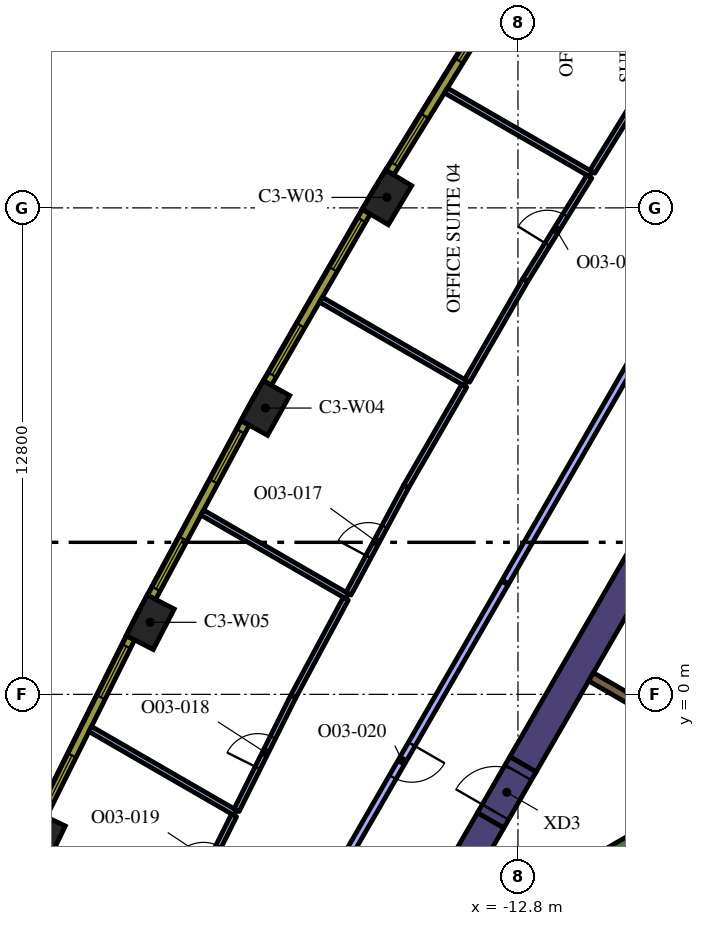
"""IFC4 building model, lengths in metres.
Left out: names, types, materials, properties, quantities, classifications, styles, units other than length and angle.
Written with IfcOpenShell. Run it as: python <this file> out.ifc"""

import sys

from ifc_helpers import new_model, si_unit, direction, frame, frame_2d, origin, origin_2d, place, context, subcontext, project, spatial, rectangle, extrude, element, fill, save


model = new_model("IFC4")
c1 = context("Model", 3, precision=1e-05, world=origin(), true_north=direction((0.0, 1.0)))
c2 = subcontext(c1, "Body", "Model", "MODEL_VIEW")
j1 = project(units=[si_unit("LENGTHUNIT", "METRE"), si_unit("PLANEANGLEUNIT", "RADIAN")], contexts=[c1])
p1 = place(None, origin())
s1 = spatial("IfcSite", under=j1, at=p1, CompositionType="ELEMENT")
p2 = place(p1, origin())
s2 = spatial("IfcBuilding", under=s1, at=p2, CompositionType="ELEMENT")
p3 = place(p2, frame((0.0, 0.0, 175.2)))
s3 = spatial("IfcBuildingStorey", under=s2, at=p3, CompositionType="ELEMENT", Elevation=175.2)
for number, where, z_axis, x_axis in (
    (1, (-16.247, 13.075, 0.0), (0.0, 0.0, 1.0), (-0.513, -0.858, 0.0)),
    (2, (-19.447, 7.533, 0.0), (0.0, 0.0, 1.0), (-0.487, -0.874, 0.0)),
    (3, (-22.476, 1.896, 0.0), (0.0, 0.0, 1.0), (-0.46, -0.888, 0.0)),
    (4, (-25.332, -3.832, 0.0), (0.0, 0.0, 1.0), (-0.433, -0.902, 0.0)),
):
    element("IfcColumn", number, at=place(p3, frame(where, z_axis=z_axis, x_axis=x_axis)), inside=s3, PredefinedType="COLUMN", context=c2, shape_type="SweptSolid", body=[
        extrude(rectangle(XDim=1.2, YDim=0.8, at=origin_2d()), origin(), (0.0, 0.0, 1.0), 4.2),
    ])
p4 = place(p3, frame((-13.518, -3.314, 0.0), z_axis=(0.0, 0.0, 1.0), x_axis=(-0.499969377405, -0.866043083026, 0.0)))
e5 = element("IfcWall", 5, at=p4, inside=s3, PredefinedType="SOLIDWALL", context=c2, shape_type="SweptSolid", body=[
    extrude(rectangle(XDim=2.824, YDim=0.8, at=frame_2d((1.412, 0.0))), origin(), (0.0, 0.0, 1.0), 4.2),
])
p5 = place(p3, frame((-12.668, -1.842, 0.0), z_axis=(0.0, 0.0, 1.0), x_axis=(0.500003640647, 0.866023301845, 0.0)))
e6 = element("IfcWall", 6, at=p5, inside=s3, PredefinedType="SOLIDWALL", context=c2, shape_type="SweptSolid", body=[
    extrude(rectangle(XDim=15.858, YDim=0.8, at=frame_2d((7.929, 0.0))), origin(), (0.0, 0.0, 1.0), 4.2),
])
p6 = place(p3, frame((-14.44, -6.49, 0.0), z_axis=(0.0, 0.0, 1.0), x_axis=(0.866022966069, 0.500004222222, 0.0)))
e7 = element("IfcWall", 7, at=p6, inside=s3, PredefinedType="SOLIDWALL", context=c2, shape_type="SweptSolid", body=[
    extrude(rectangle(XDim=6.8, YDim=0.25, at=frame_2d((3.4, 0.0))), origin(), (0.0, 0.0, 1.0), 4.2),
])
p7 = place(p3, frame((-8.106, -1.14, 0.0), z_axis=(0.0, 0.0, 1.0), x_axis=(-0.866008981251, 0.500028443584, 0.0)))
e8 = element("IfcWall", 8, at=p7, inside=s3, PredefinedType="SOLIDWALL", context=c2, shape_type="SweptSolid", body=[
    extrude(rectangle(XDim=3.2, YDim=0.25, at=frame_2d((1.6, 0.0))), origin(), (0.0, 0.0, 1.0), 4.2),
])
p8 = place(p3, frame((-13.518, -3.314, 0.0), z_axis=(0.0, 0.0, 1.0), x_axis=(0.500000056704, 0.866025371046, 0.0)))
e9 = element("IfcWall", 9, at=p8, inside=s3, PredefinedType="SOLIDWALL", context=c2, shape_type="SweptSolid", body=[
    extrude(rectangle(XDim=1.7, YDim=0.8, at=frame_2d((0.85, 0.0))), origin(), (0.0, 0.0, 1.0), 4.2),
])
p9 = place(p8, frame((0.25, 0.0, 0.0)))
e10 = element("IfcOpeningElement", 10, at=p9, cuts=e9, PredefinedType="OPENING", context=c2, shape_type="SweptSolid", body=[
    extrude(rectangle(XDim=1.2, YDim=2.1, at=frame_2d((0.6, 1.05))), frame((0.0, 0.41, 0.0), z_axis=(0.0, -1.0, 0.0), x_axis=(1.0, 0.0, 0.0)), (0.0, 0.0, 1.0), 0.82),
])
p10 = place(p3, frame((-10.883, 13.687, 0.0), z_axis=(0.0, 0.0, 1.0), x_axis=(-0.866033195618, 0.499986503906, 0.0)))
e11 = element("IfcWall", 11, at=p10, inside=s3, PredefinedType="PARTITIONING", context=c2, shape_type="SweptSolid", body=[
    extrude(rectangle(XDim=4.402, YDim=0.15, at=frame_2d((2.201, 0.0))), origin(), (0.0, 0.0, 1.0), 3.15),
])
p11 = place(p3, frame((-9.308, 16.231, 0.0), z_axis=(0.0, 0.0, 1.0), x_axis=(-0.526201893736, -0.850359669216, 0.0)))
e12 = element("IfcWall", 12, at=p11, inside=s3, PredefinedType="PARTITIONING", context=c2, shape_type="SweptSolid", body=[
    extrude(rectangle(XDim=2.917, YDim=0.15, at=frame_2d((1.458, 0.0))), origin(), (0.0, 0.0, 1.0), 3.15),
])
p12 = place(p3, frame((-14.175, 8.184, 0.0), z_axis=(0.0, 0.0, 1.0), x_axis=(-0.866032203192, 0.499988222896, 0.0)))
e13 = element("IfcWall", 13, at=p12, inside=s3, PredefinedType="PARTITIONING", context=c2, shape_type="SweptSolid", body=[
    extrude(rectangle(XDim=4.4, YDim=0.15, at=frame_2d((2.2, 0.0))), origin(), (0.0, 0.0, 1.0), 3.15),
])
p13 = place(p3, frame((-12.608, 10.899, 0.0), z_axis=(0.0, 0.0, 1.0), x_axis=(0.526170942761, 0.850378820876, 0.0)))
e14 = element("IfcWall", 14, at=p13, inside=s3, PredefinedType="PARTITIONING", context=c2, shape_type="SweptSolid", body=[
    extrude(rectangle(XDim=3.203, YDim=0.15, at=frame_2d((1.602, 0.0))), origin(), (0.0, 0.0, 1.0), 3.15),
])
p14 = place(p13, frame((1.103, 0.0, 0.0)))
e15 = element("IfcOpeningElement", 15, at=p14, cuts=e14, PredefinedType="OPENING", context=c2, shape_type="SweptSolid", body=[
    extrude(rectangle(XDim=0.9, YDim=2.1, at=frame_2d((0.45, 1.05))), frame((0.0, 0.085, 0.0), z_axis=(0.0, -1.0, 0.0), x_axis=(1.0, 0.0, 0.0)), (0.0, 0.0, 1.0), 0.17),
])
p15 = place(p3, frame((-12.608, 10.899, 0.0), z_axis=(0.0, 0.0, 1.0), x_axis=(-0.499991792115, -0.866030142557, 0.0)))
e16 = element("IfcWall", 16, at=p15, inside=s3, PredefinedType="PARTITIONING", context=c2, shape_type="SweptSolid", body=[
    extrude(rectangle(XDim=3.06, YDim=0.15, at=frame_2d((1.53, 0.0))), origin(), (0.0, 0.0, 1.0), 3.15),
])
p16 = place(p3, frame((-17.295, 2.581, 0.0), z_axis=(0.0, 0.0, 1.0), x_axis=(-0.866033195618, 0.499986503906, 0.0)))
e17 = element("IfcWall", 17, at=p16, inside=s3, PredefinedType="PARTITIONING", context=c2, shape_type="SweptSolid", body=[
    extrude(rectangle(XDim=4.402, YDim=0.15, at=frame_2d((2.201, 0.0))), origin(), (0.0, 0.0, 1.0), 3.15),
])
p17 = place(p3, frame((-14.213, 8.119, 0.0), z_axis=(0.0, 0.0, 1.0), x_axis=(-0.499991792115, -0.866030142557, 0.0)))
e18 = element("IfcWall", 18, at=p17, inside=s3, PredefinedType="PARTITIONING", context=c2, shape_type="SweptSolid", body=[
    extrude(rectangle(XDim=3.06, YDim=0.15, at=frame_2d((1.53, 0.0))), origin(), (0.0, 0.0, 1.0), 3.15),
])
p18 = place(p3, frame((-17.259, 2.647, 0.0), z_axis=(0.0, 0.0, 1.0), x_axis=(0.473299711777, 0.880901460341, 0.0)))
e19 = element("IfcWall", 19, at=p18, inside=s3, PredefinedType="PARTITIONING", context=c2, shape_type="SweptSolid", body=[
    extrude(rectangle(XDim=3.203, YDim=0.15, at=frame_2d((1.602, 0.0))), origin(), (0.0, 0.0, 1.0), 3.15),
])
p19 = place(p18, frame((1.104, 0.0, 0.0)))
e20 = element("IfcOpeningElement", 20, at=p19, cuts=e19, PredefinedType="OPENING", context=c2, shape_type="SweptSolid", body=[
    extrude(rectangle(XDim=0.9, YDim=2.1, at=frame_2d((0.45, 1.05))), frame((0.0, 0.085, 0.0), z_axis=(0.0, -1.0, 0.0), x_axis=(1.0, 0.0, 0.0)), (0.0, 0.0, 1.0), 0.17),
])
p20 = place(p3, frame((-20.238, -3.117, 0.0), z_axis=(0.0, 0.0, 1.0), x_axis=(-0.866026031126, 0.499998913411, 0.0)))
e21 = element("IfcWall", 21, at=p20, inside=s3, PredefinedType="PARTITIONING", context=c2, shape_type="SweptSolid", body=[
    extrude(rectangle(XDim=4.408, YDim=0.15, at=frame_2d((2.204, 0.0))), origin(), (0.0, 0.0, 1.0), 3.15),
])
p21 = place(p3, frame((-17.33, 2.515, 0.0), z_axis=(0.0, 0.0, 1.0), x_axis=(-0.473335958085, -0.880881984595, 0.0)))
e22 = element("IfcWall", 22, at=p21, inside=s3, PredefinedType="PARTITIONING", context=c2, shape_type="SweptSolid", body=[
    extrude(rectangle(XDim=2.917, YDim=0.15, at=frame_2d((1.458, 0.0))), origin(), (0.0, 0.0, 1.0), 3.15),
])
p22 = place(p3, frame((-20.204, -3.049, 0.0), z_axis=(0.0, 0.0, 1.0), x_axis=(0.446250363478, 0.894908159029, 0.0)))
e23 = element("IfcWall", 23, at=p22, inside=s3, PredefinedType="PARTITIONING", context=c2, shape_type="SweptSolid", body=[
    extrude(rectangle(XDim=3.347, YDim=0.15, at=frame_2d((1.673, 0.0))), origin(), (0.0, 0.0, 1.0), 3.15),
])
p23 = place(p22, frame((1.247, 0.0, 0.0)))
e24 = element("IfcOpeningElement", 24, at=p23, cuts=e23, PredefinedType="OPENING", context=c2, shape_type="SweptSolid", body=[
    extrude(rectangle(XDim=0.9, YDim=2.1, at=frame_2d((0.45, 1.05))), frame((0.0, 0.085, 0.0), z_axis=(0.0, -1.0, 0.0), x_axis=(1.0, 0.0, 0.0)), (0.0, 0.0, 1.0), 0.17),
])
p24 = place(p3, frame((-21.509, -5.666, 0.0), z_axis=(0.0, 0.0, 1.0), x_axis=(0.446192228952, 0.894937145739, 0.0)))
e25 = element("IfcWall", 25, at=p24, inside=s3, PredefinedType="PARTITIONING", context=c2, shape_type="SweptSolid", body=[
    extrude(rectangle(XDim=2.774, YDim=0.15, at=frame_2d((1.387, 0.0))), origin(), (0.0, 0.0, 1.0), 3.15),
])
p25 = place(p24, frame((0.973, 0.0, 0.0)))
e26 = element("IfcOpeningElement", 26, at=p25, cuts=e25, PredefinedType="OPENING", context=c2, shape_type="SweptSolid", body=[
    extrude(rectangle(XDim=0.9, YDim=2.1, at=frame_2d((0.45, 1.05))), frame((0.0, 0.085, 0.0), z_axis=(0.0, -1.0, 0.0), x_axis=(1.0, 0.0, 0.0)), (0.0, 0.0, 1.0), 0.17),
])
p26 = place(p3, frame((-9.126, 9.893, 0.0), z_axis=(0.0, 0.0, 1.0), x_axis=(-0.499995158272, -0.866028199139, 0.0)))
e27 = element("IfcWall", 27, at=p26, inside=s3, PredefinedType="PARTITIONING", context=c2, shape_type="SweptSolid", body=[
    extrude(rectangle(XDim=8.008, YDim=0.2, at=frame_2d((4.004, 0.0))), origin(), (0.0, 0.0, 1.0), 3.15),
])
p27 = place(p3, frame((-13.146, 2.931, 0.0), z_axis=(0.0, 0.0, 1.0), x_axis=(-0.499997861235, -0.866026638597, 0.0)))
e28 = element("IfcWall", 28, at=p27, inside=s3, PredefinedType="PARTITIONING", context=c2, shape_type="SweptSolid", body=[
    extrude(rectangle(XDim=10.717, YDim=0.2, at=frame_2d((5.359, 0.0))), origin(), (0.0, 0.0, 1.0), 3.15),
])
p28 = place(p27, frame((4.9, 0.0, 0.0)))
e29 = element("IfcOpeningElement", 29, at=p28, cuts=e28, PredefinedType="OPENING", context=c2, shape_type="SweptSolid", body=[
    extrude(rectangle(XDim=1.0, YDim=2.1, at=frame_2d((0.5, 1.05))), frame((0.0, 0.11, 0.0), z_axis=(0.0, -1.0, 0.0), x_axis=(1.0, 0.0, 0.0)), (0.0, 0.0, 1.0), 0.22),
])
p29 = place(p3, frame((-13.433, 18.156, 0.0), z_axis=(0.0, 0.0, 1.0), x_axis=(-0.526197926587, -0.850362124072, 0.0)))
e30 = element("IfcWall", 30, at=p29, inside=s3, PredefinedType="SOLIDWALL", context=c2, shape_type="SweptSolid", body=[
    extrude(rectangle(XDim=5.203, YDim=0.24, at=frame_2d((2.602, 0.0))), origin(), (0.0, 0.0, 1.0), 3.95),
])
p30 = place(p29, frame((0.248, 0.0, 0.9)))
e31 = element("IfcOpeningElement", 31, at=p30, cuts=e30, PredefinedType="OPENING", context=c2, shape_type="SweptSolid", body=[
    extrude(rectangle(XDim=1.5, YDim=2.55, at=frame_2d((0.75, 1.275))), frame((0.0, 0.13, 0.0), z_axis=(0.0, -1.0, 0.0), x_axis=(1.0, 0.0, 0.0)), (0.0, 0.0, 1.0), 0.26),
])
p31 = place(p29, frame((3.455, 0.0, 0.9)))
e32 = element("IfcOpeningElement", 32, at=p31, cuts=e30, PredefinedType="OPENING", context=c2, shape_type="SweptSolid", body=[
    extrude(rectangle(XDim=1.5, YDim=2.55, at=frame_2d((0.75, 1.275))), frame((0.0, 0.13, 0.0), z_axis=(0.0, -1.0, 0.0), x_axis=(1.0, 0.0, 0.0)), (0.0, 0.0, 1.0), 0.26),
])
p32 = place(p3, frame((-16.789, 12.697, 0.0), z_axis=(0.0, 0.0, 1.0), x_axis=(-0.500009456303, -0.866019944116, 0.0)))
e33 = element("IfcWall", 33, at=p32, inside=s3, PredefinedType="SOLIDWALL", context=c2, shape_type="SweptSolid", body=[
    extrude(rectangle(XDim=5.204, YDim=0.24, at=frame_2d((2.602, 0.0))), origin(), (0.0, 0.0, 1.0), 3.95),
])
p33 = place(p32, frame((0.248, 0.0, 0.9)))
e34 = element("IfcOpeningElement", 34, at=p33, cuts=e33, PredefinedType="OPENING", context=c2, shape_type="SweptSolid", body=[
    extrude(rectangle(XDim=1.5, YDim=2.55, at=frame_2d((0.75, 1.275))), frame((0.0, 0.13, 0.0), z_axis=(0.0, -1.0, 0.0), x_axis=(1.0, 0.0, 0.0)), (0.0, 0.0, 1.0), 0.26),
])
p34 = place(p32, frame((3.455, 0.0, 0.9)))
e35 = element("IfcOpeningElement", 35, at=p34, cuts=e33, PredefinedType="OPENING", context=c2, shape_type="SweptSolid", body=[
    extrude(rectangle(XDim=1.5, YDim=2.55, at=frame_2d((0.75, 1.275))), frame((0.0, 0.13, 0.0), z_axis=(0.0, -1.0, 0.0), x_axis=(1.0, 0.0, 0.0)), (0.0, 0.0, 1.0), 0.26),
])
p35 = place(p3, frame((-19.977, 7.139, 0.0), z_axis=(0.0, 0.0, 1.0), x_axis=(-0.473349833294, -0.880874528704, 0.0)))
e36 = element("IfcWall", 36, at=p35, inside=s3, PredefinedType="SOLIDWALL", context=c2, shape_type="SweptSolid", body=[
    extrude(rectangle(XDim=5.204, YDim=0.24, at=frame_2d((2.602, 0.0))), origin(), (0.0, 0.0, 1.0), 3.95),
])
p36 = place(p35, frame((0.248, 0.0, 0.9)))
e37 = element("IfcOpeningElement", 37, at=p36, cuts=e36, PredefinedType="OPENING", context=c2, shape_type="SweptSolid", body=[
    extrude(rectangle(XDim=1.5, YDim=2.55, at=frame_2d((0.75, 1.275))), frame((0.0, 0.13, 0.0), z_axis=(0.0, -1.0, 0.0), x_axis=(1.0, 0.0, 0.0)), (0.0, 0.0, 1.0), 0.26),
])
p37 = place(p35, frame((3.455, 0.0, 0.9)))
e38 = element("IfcOpeningElement", 38, at=p37, cuts=e36, PredefinedType="OPENING", context=c2, shape_type="SweptSolid", body=[
    extrude(rectangle(XDim=1.5, YDim=2.55, at=frame_2d((0.75, 1.275))), frame((0.0, 0.13, 0.0), z_axis=(0.0, -1.0, 0.0), x_axis=(1.0, 0.0, 0.0)), (0.0, 0.0, 1.0), 0.26),
])
p38 = place(p3, frame((-22.994, 1.485, 0.0), z_axis=(0.0, 0.0, 1.0), x_axis=(-0.446256171312, -0.8949052629, 0.0)))
e39 = element("IfcWall", 39, at=p38, inside=s3, PredefinedType="SOLIDWALL", context=c2, shape_type="SweptSolid", body=[
    extrude(rectangle(XDim=5.203, YDim=0.24, at=frame_2d((2.602, 0.0))), origin(), (0.0, 0.0, 1.0), 3.95),
])
p39 = place(p38, frame((0.248, 0.0, 0.9)))
e40 = element("IfcOpeningElement", 40, at=p39, cuts=e39, PredefinedType="OPENING", context=c2, shape_type="SweptSolid", body=[
    extrude(rectangle(XDim=1.5, YDim=2.55, at=frame_2d((0.75, 1.275))), frame((0.0, 0.13, 0.0), z_axis=(0.0, -1.0, 0.0), x_axis=(1.0, 0.0, 0.0)), (0.0, 0.0, 1.0), 0.26),
])
p40 = place(p38, frame((3.455, 0.0, 0.9)))
e41 = element("IfcOpeningElement", 41, at=p40, cuts=e39, PredefinedType="OPENING", context=c2, shape_type="SweptSolid", body=[
    extrude(rectangle(XDim=1.5, YDim=2.55, at=frame_2d((0.75, 1.275))), frame((0.0, 0.13, 0.0), z_axis=(0.0, -1.0, 0.0), x_axis=(1.0, 0.0, 0.0)), (0.0, 0.0, 1.0), 0.26),
])
p41 = place(p9, origin())
e42 = element("IfcDoor", 42, at=p41, inside=s3, OperationType="SINGLE_SWING_LEFT", PredefinedType="DOOR", context=c2, shape_type="SweptSolid", body=[
    extrude(rectangle(XDim=1.2, YDim=2.1, at=frame_2d((0.6, 1.05))), frame((0.0, 0.025, 0.0), z_axis=(0.0, -1.0, 0.0), x_axis=(1.0, 0.0, 0.0)), (0.0, 0.0, 1.0), 0.05),
])
fill(e10, e42)
p42 = place(p14, origin())
e43 = element("IfcDoor", 43, at=p42, inside=s3, OperationType="SINGLE_SWING_LEFT", PredefinedType="DOOR", context=c2, shape_type="SweptSolid", body=[
    extrude(rectangle(XDim=0.9, YDim=2.1, at=frame_2d((0.45, 1.05))), frame((0.0, 0.025, 0.0), z_axis=(0.0, -1.0, 0.0), x_axis=(1.0, 0.0, 0.0)), (0.0, 0.0, 1.0), 0.05),
])
fill(e15, e43)
p43 = place(p19, origin())
e44 = element("IfcDoor", 44, at=p43, inside=s3, OperationType="SINGLE_SWING_LEFT", PredefinedType="DOOR", context=c2, shape_type="SweptSolid", body=[
    extrude(rectangle(XDim=0.9, YDim=2.1, at=frame_2d((0.45, 1.05))), frame((0.0, 0.025, 0.0), z_axis=(0.0, -1.0, 0.0), x_axis=(1.0, 0.0, 0.0)), (0.0, 0.0, 1.0), 0.05),
])
fill(e20, e44)
p44 = place(p23, origin())
e45 = element("IfcDoor", 45, at=p44, inside=s3, OperationType="SINGLE_SWING_RIGHT", PredefinedType="DOOR", context=c2, shape_type="SweptSolid", body=[
    extrude(rectangle(XDim=0.9, YDim=2.1, at=frame_2d((0.45, 1.05))), frame((0.0, 0.025, 0.0), z_axis=(0.0, -1.0, 0.0), x_axis=(1.0, 0.0, 0.0)), (0.0, 0.0, 1.0), 0.05),
])
fill(e24, e45)
p45 = place(p25, origin())
e46 = element("IfcDoor", 46, at=p45, inside=s3, OperationType="SINGLE_SWING_RIGHT", PredefinedType="DOOR", context=c2, shape_type="SweptSolid", body=[
    extrude(rectangle(XDim=0.9, YDim=2.1, at=frame_2d((0.45, 1.05))), frame((0.0, 0.025, 0.0), z_axis=(0.0, -1.0, 0.0), x_axis=(1.0, 0.0, 0.0)), (0.0, 0.0, 1.0), 0.05),
])
fill(e26, e46)
p46 = place(p28, origin())
e47 = element("IfcDoor", 47, at=p46, inside=s3, OperationType="SINGLE_SWING_RIGHT", PredefinedType="DOOR", context=c2, shape_type="SweptSolid", body=[
    extrude(rectangle(XDim=1.0, YDim=2.1, at=frame_2d((0.5, 1.05))), frame((0.0, 0.025, 0.0), z_axis=(0.0, -1.0, 0.0), x_axis=(1.0, 0.0, 0.0)), (0.0, 0.0, 1.0), 0.05),
])
fill(e29, e47)
p47 = place(p30, origin())
e48 = element("IfcWindow", 48, at=p47, inside=s3, PartitioningType="SINGLE_PANEL", PredefinedType="WINDOW", context=c2, shape_type="SweptSolid", body=[
    extrude(rectangle(XDim=1.5, YDim=2.55, at=frame_2d((0.75, 1.275))), frame((0.0, 0.04, 0.0), z_axis=(0.0, -1.0, 0.0), x_axis=(1.0, 0.0, 0.0)), (0.0, 0.0, 1.0), 0.06),
])
fill(e31, e48)
p48 = place(p31, origin())
e49 = element("IfcWindow", 49, at=p48, inside=s3, PartitioningType="SINGLE_PANEL", PredefinedType="WINDOW", context=c2, shape_type="SweptSolid", body=[
    extrude(rectangle(XDim=1.5, YDim=2.55, at=frame_2d((0.75, 1.275))), frame((0.0, 0.04, 0.0), z_axis=(0.0, -1.0, 0.0), x_axis=(1.0, 0.0, 0.0)), (0.0, 0.0, 1.0), 0.06),
])
fill(e32, e49)
p49 = place(p33, origin())
e50 = element("IfcWindow", 50, at=p49, inside=s3, PartitioningType="SINGLE_PANEL", PredefinedType="WINDOW", context=c2, shape_type="SweptSolid", body=[
    extrude(rectangle(XDim=1.5, YDim=2.55, at=frame_2d((0.75, 1.275))), frame((0.0, 0.04, 0.0), z_axis=(0.0, -1.0, 0.0), x_axis=(1.0, 0.0, 0.0)), (0.0, 0.0, 1.0), 0.06),
])
fill(e34, e50)
p50 = place(p34, origin())
e51 = element("IfcWindow", 51, at=p50, inside=s3, PartitioningType="SINGLE_PANEL", PredefinedType="WINDOW", context=c2, shape_type="SweptSolid", body=[
    extrude(rectangle(XDim=1.5, YDim=2.55, at=frame_2d((0.75, 1.275))), frame((0.0, 0.04, 0.0), z_axis=(0.0, -1.0, 0.0), x_axis=(1.0, 0.0, 0.0)), (0.0, 0.0, 1.0), 0.06),
])
fill(e35, e51)
p51 = place(p36, origin())
e52 = element("IfcWindow", 52, at=p51, inside=s3, PartitioningType="SINGLE_PANEL", PredefinedType="WINDOW", context=c2, shape_type="SweptSolid", body=[
    extrude(rectangle(XDim=1.5, YDim=2.55, at=frame_2d((0.75, 1.275))), frame((0.0, 0.04, 0.0), z_axis=(0.0, -1.0, 0.0), x_axis=(1.0, 0.0, 0.0)), (0.0, 0.0, 1.0), 0.06),
])
fill(e37, e52)
p52 = place(p37, origin())
e53 = element("IfcWindow", 53, at=p52, inside=s3, PartitioningType="SINGLE_PANEL", PredefinedType="WINDOW", context=c2, shape_type="SweptSolid", body=[
    extrude(rectangle(XDim=1.5, YDim=2.55, at=frame_2d((0.75, 1.275))), frame((0.0, 0.04, 0.0), z_axis=(0.0, -1.0, 0.0), x_axis=(1.0, 0.0, 0.0)), (0.0, 0.0, 1.0), 0.06),
])
fill(e38, e53)
p53 = place(p39, origin())
e54 = element("IfcWindow", 54, at=p53, inside=s3, PartitioningType="SINGLE_PANEL", PredefinedType="WINDOW", context=c2, shape_type="SweptSolid", body=[
    extrude(rectangle(XDim=1.5, YDim=2.55, at=frame_2d((0.75, 1.275))), frame((0.0, 0.04, 0.0), z_axis=(0.0, -1.0, 0.0), x_axis=(1.0, 0.0, 0.0)), (0.0, 0.0, 1.0), 0.06),
])
fill(e40, e54)
p54 = place(p40, origin())
e55 = element("IfcWindow", 55, at=p54, inside=s3, PartitioningType="SINGLE_PANEL", PredefinedType="WINDOW", context=c2, shape_type="SweptSolid", body=[
    extrude(rectangle(XDim=1.5, YDim=2.55, at=frame_2d((0.75, 1.275))), frame((0.0, 0.04, 0.0), z_axis=(0.0, -1.0, 0.0), x_axis=(1.0, 0.0, 0.0)), (0.0, 0.0, 1.0), 0.06),
])
fill(e41, e55)
save(model, sys.argv[1])
